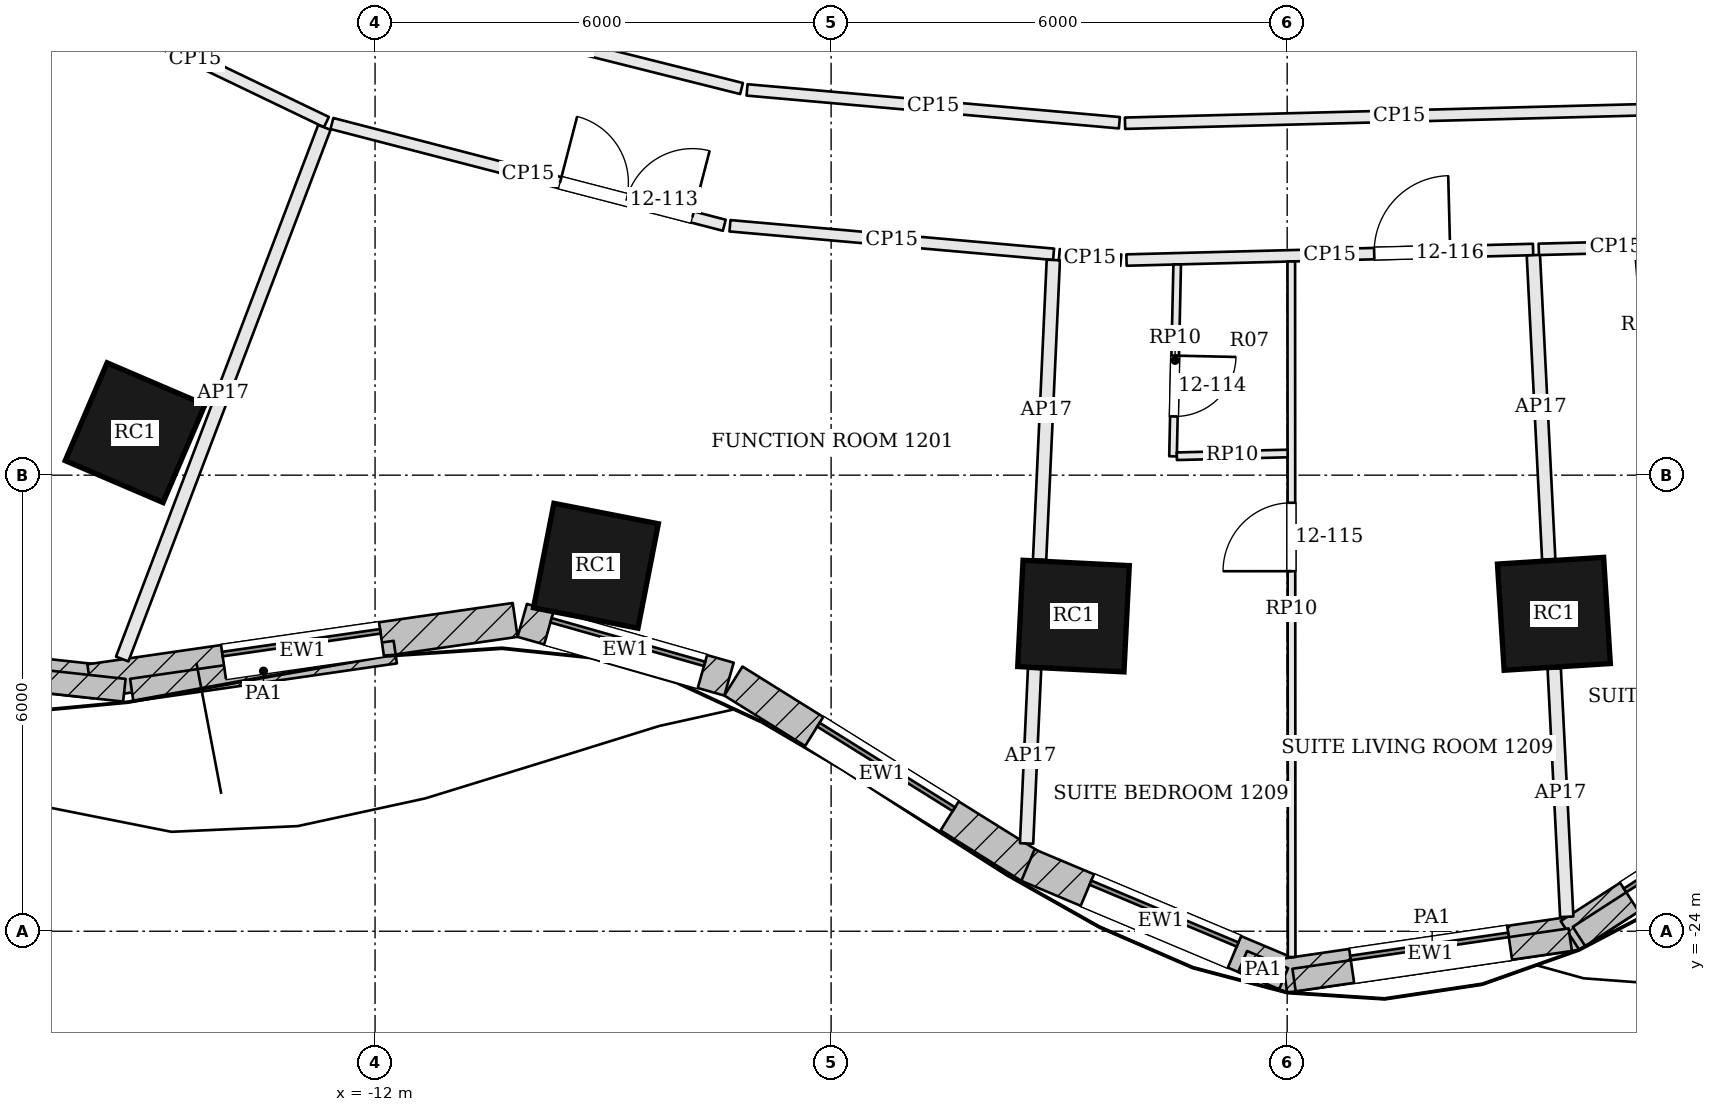
"""IFC4 building model, lengths in metres.
Left out: names, types, materials, properties, quantities, classifications, styles, units other than length and angle.
Written with IfcOpenShell. Run it as: python <this file> out.ifc"""

import sys

from ifc_helpers import new_model, si_unit, direction, frame, frame_2d, origin, origin_2d, place, context, subcontext, project, spatial, rectangle, extrude, element, fill, save


model = new_model("IFC4")
c1 = context("Model", 3, precision=1e-05, world=origin(), true_north=direction((0.0, 1.0)))
c2 = subcontext(c1, "Body", "Model", "MODEL_VIEW")
j1 = project(units=[si_unit("LENGTHUNIT", "METRE"), si_unit("PLANEANGLEUNIT", "RADIAN")], contexts=[c1])
p1 = place(None, origin())
s1 = spatial("IfcSite", under=j1, at=p1, CompositionType="ELEMENT")
p2 = place(p1, origin())
s2 = spatial("IfcBuilding", under=s1, at=p2, CompositionType="ELEMENT")
p3 = place(p2, frame((0.0, 0.0, 59.1)))
s3 = spatial("IfcBuildingStorey", under=s2, at=p3, CompositionType="ELEMENT", Elevation=59.1)
for number, where, z_axis, x_axis in (
    (1, (-15.157, -17.441, 0.0), (0.0, 0.0, 1.0), (0.919, -0.394, 0.0)),
    (2, (-9.094, -19.192, 0.0), (0.0, 0.0, 1.0), (0.981, -0.192, 0.0)),
    (3, (-2.811, -19.854, 0.0), (0.0, 0.0, 1.0), (0.999, -0.05, 0.0)),
    (4, (3.509, -19.824, 0.0), (0.0, 0.0, 1.0), (0.998, 0.063, 0.0)),
):
    element("IfcColumn", number, at=place(p3, frame(where, z_axis=z_axis, x_axis=x_axis)), inside=s3, PredefinedType="COLUMN", context=c2, shape_type="SweptSolid", body=[
        extrude(rectangle(XDim=1.4, YDim=1.4, at=origin_2d()), origin(), (0.0, 0.0, 1.0), 3.6),
    ])
p4 = place(p3, frame((-20.396, -20.196, 0.0), z_axis=(0.0, 0.0, 1.0), x_axis=(0.994063142291, -0.108804729393, 0.0)))
e5 = element("IfcWall", 5, at=p4, inside=s3, PredefinedType="SOLIDWALL", context=c2, shape_type="SweptSolid", body=[
    extrude(rectangle(XDim=4.728, YDim=0.45, at=frame_2d((2.364, 0.0))), origin(), (0.0, 0.0, 1.0), 3.4),
])
p5 = place(p4, frame((1.314, 0.0, 0.9)))
e6 = element("IfcOpeningElement", 6, at=p5, cuts=e5, PredefinedType="OPENING", context=c2, shape_type="SweptSolid", body=[
    extrude(rectangle(XDim=2.1, YDim=2.0, at=frame_2d((1.05, 1.0))), frame((0.0, 0.235, 0.0), z_axis=(0.0, -1.0, 0.0), x_axis=(1.0, 0.0, 0.0)), (0.0, 0.0, 1.0), 0.47),
])
p6 = place(p3, frame((-15.752, -20.711, 0.0), z_axis=(0.0, 0.0, 1.0), x_axis=(0.989761192351, 0.142733255115, 0.0)))
e7 = element("IfcWall", 7, at=p6, inside=s3, PredefinedType="SOLIDWALL", context=c2, shape_type="SweptSolid", body=[
    extrude(rectangle(XDim=5.653, YDim=0.45, at=frame_2d((2.827, 0.0))), origin(), (0.0, 0.0, 1.0), 3.4),
])
p7 = place(p6, frame((1.777, 0.0, 0.9)))
e8 = element("IfcOpeningElement", 8, at=p7, cuts=e7, PredefinedType="OPENING", context=c2, shape_type="SweptSolid", body=[
    extrude(rectangle(XDim=2.1, YDim=2.0, at=frame_2d((1.05, 1.0))), frame((0.0, 0.235, 0.0), z_axis=(0.0, -1.0, 0.0), x_axis=(1.0, 0.0, 0.0)), (0.0, 0.0, 1.0), 0.47),
])
p8 = place(p3, frame((-10.063, -19.911, 0.0), z_axis=(0.0, 0.0, 1.0), x_axis=(0.961982029567, -0.273112751057, 0.0)))
e9 = element("IfcWall", 9, at=p8, inside=s3, PredefinedType="SOLIDWALL", context=c2, shape_type="SweptSolid", body=[
    extrude(rectangle(XDim=2.827, YDim=0.45, at=frame_2d((1.414, 0.0))), origin(), (0.0, 0.0, 1.0), 3.4),
])
p9 = place(p8, frame((0.364, 0.0, 0.9)))
e10 = element("IfcOpeningElement", 10, at=p9, cuts=e9, PredefinedType="OPENING", context=c2, shape_type="SweptSolid", body=[
    extrude(rectangle(XDim=2.1, YDim=2.0, at=frame_2d((1.05, 1.0))), frame((0.0, 0.235, 0.0), z_axis=(0.0, -1.0, 0.0), x_axis=(1.0, 0.0, 0.0)), (0.0, 0.0, 1.0), 0.47),
])
p10 = place(p3, frame((-7.286, -20.708, 0.0), z_axis=(0.0, 0.0, 1.0), x_axis=(0.848420894374, -0.529322194878, 0.0)))
e11 = element("IfcWall", 11, at=p10, inside=s3, PredefinedType="SOLIDWALL", context=c2, shape_type="SweptSolid", body=[
    extrude(rectangle(XDim=4.606, YDim=0.45, at=frame_2d((2.303, 0.0))), origin(), (0.0, 0.0, 1.0), 3.4),
])
p11 = place(p10, frame((1.253, 0.0, 0.9)))
e12 = element("IfcOpeningElement", 12, at=p11, cuts=e11, PredefinedType="OPENING", context=c2, shape_type="SweptSolid", body=[
    extrude(rectangle(XDim=2.1, YDim=2.0, at=frame_2d((1.05, 1.0))), frame((0.0, 0.235, 0.0), z_axis=(0.0, -1.0, 0.0), x_axis=(1.0, 0.0, 0.0)), (0.0, 0.0, 1.0), 0.47),
])
p12 = place(p3, frame((-3.41, -23.13, 0.0), z_axis=(0.0, 0.0, 1.0), x_axis=(0.921914994676, -0.387392233521, 0.0)))
e13 = element("IfcWall", 13, at=p12, inside=s3, PredefinedType="SOLIDWALL", context=c2, shape_type="SweptSolid", body=[
    extrude(rectangle(XDim=3.793, YDim=0.45, at=frame_2d((1.896, 0.0))), origin(), (0.0, 0.0, 1.0), 3.4),
])
p13 = place(p12, frame((0.847, 0.0, 0.9)))
e14 = element("IfcOpeningElement", 14, at=p13, cuts=e13, PredefinedType="OPENING", context=c2, shape_type="SweptSolid", body=[
    extrude(rectangle(XDim=2.1, YDim=2.0, at=frame_2d((1.05, 1.0))), frame((0.0, 0.235, 0.0), z_axis=(0.0, -1.0, 0.0), x_axis=(1.0, 0.0, 0.0)), (0.0, 0.0, 1.0), 0.47),
])
p14 = place(p3, frame((-0.032, -24.584, 0.0), z_axis=(0.0, 0.0, 1.0), x_axis=(0.989495330387, 0.144564833698, 0.0)))
e15 = element("IfcWall", 15, at=p14, inside=s3, PredefinedType="SOLIDWALL", context=c2, shape_type="SweptSolid", body=[
    extrude(rectangle(XDim=3.881, YDim=0.45, at=frame_2d((1.94, 0.0))), origin(), (0.0, 0.0, 1.0), 3.4),
])
p15 = place(p14, frame((0.89, 0.0, 0.9)))
e16 = element("IfcOpeningElement", 16, at=p15, cuts=e15, PredefinedType="OPENING", context=c2, shape_type="SweptSolid", body=[
    extrude(rectangle(XDim=2.1, YDim=2.0, at=frame_2d((1.05, 1.0))), frame((0.0, 0.235, 0.0), z_axis=(0.0, -1.0, 0.0), x_axis=(1.0, 0.0, 0.0)), (0.0, 0.0, 1.0), 0.47),
])
p16 = place(p3, frame((3.721, -24.055, 0.0), z_axis=(0.0, 0.0, 1.0), x_axis=(0.840404438766, 0.54195975801, 0.0)))
e17 = element("IfcWall", 17, at=p16, inside=s3, PredefinedType="SOLIDWALL", context=c2, shape_type="SweptSolid", body=[
    extrude(rectangle(XDim=3.96, YDim=0.45, at=frame_2d((1.98, 0.0))), origin(), (0.0, 0.0, 1.0), 3.4),
])
p17 = place(p16, frame((0.93, 0.0, 0.9)))
e18 = element("IfcOpeningElement", 18, at=p17, cuts=e17, PredefinedType="OPENING", context=c2, shape_type="SweptSolid", body=[
    extrude(rectangle(XDim=2.1, YDim=2.0, at=frame_2d((1.05, 1.0))), frame((0.0, 0.235, 0.0), z_axis=(0.0, -1.0, 0.0), x_axis=(1.0, 0.0, 0.0)), (0.0, 0.0, 1.0), 0.47),
])
p18 = place(p3, frame((-17.772, -20.559, 3.6), z_axis=(0.0, 0.0, 1.0), x_axis=(0.994063072833, -0.108805363973, 0.0)))
e19 = element("IfcWall", 19, at=p18, inside=s3, PredefinedType="PARAPET", context=c2, shape_type="SweptSolid", body=[
    extrude(rectangle(XDim=2.489, YDim=0.3, at=frame_2d((1.244, 0.0))), origin(), (0.0, 0.0, 1.0), 1.1),
])
p19 = place(p3, frame((-15.201, -20.828, 3.6), z_axis=(0.0, 0.0, 1.0), x_axis=(0.989761856496, 0.142728649634, 0.0)))
e20 = element("IfcWall", 20, at=p19, inside=s3, PredefinedType="PARAPET", context=c2, shape_type="SweptSolid", body=[
    extrude(rectangle(XDim=3.503, YDim=0.3, at=frame_2d((1.751, 0.0))), origin(), (0.0, 0.0, 1.0), 1.1),
])
p20 = place(p3, frame((-0.586, -24.398, 3.6), z_axis=(0.0, 0.0, 1.0), x_axis=(0.921949320844, -0.387310534062, 0.0)))
e21 = element("IfcWall", 21, at=p20, inside=s3, PredefinedType="PARAPET", context=c2, shape_type="SweptSolid", body=[
    extrude(rectangle(XDim=0.585, YDim=0.3, at=frame_2d((0.292, 0.0))), origin(), (0.0, 0.0, 1.0), 1.1),
])
p21 = place(p3, frame((0.091, -24.642, 3.6), z_axis=(0.0, 0.0, 1.0), x_axis=(0.989499132051, 0.144538810259, 0.0)))
e22 = element("IfcWall", 22, at=p21, inside=s3, PredefinedType="PARAPET", context=c2, shape_type="SweptSolid", body=[
    extrude(rectangle(XDim=3.672, YDim=0.3, at=frame_2d((1.836, 0.0))), origin(), (0.0, 0.0, 1.0), 1.1),
])
p22 = place(p3, frame((3.839, -24.068, 3.6), z_axis=(0.0, 0.0, 1.0), x_axis=(0.84044157539, 0.541902166776, 0.0)))
e23 = element("IfcWall", 23, at=p22, inside=s3, PredefinedType="PARAPET", context=c2, shape_type="SweptSolid", body=[
    extrude(rectangle(XDim=3.836, YDim=0.3, at=frame_2d((1.918, 0.0))), origin(), (0.0, 0.0, 1.0), 1.1),
])
p23 = place(p3, frame((-16.094, -11.696, 0.0), z_axis=(0.0, 0.0, 1.0), x_axis=(0.901437528344, -0.432909208141, 0.0)))
e24 = element("IfcWall", 24, at=p23, inside=s3, PredefinedType="PARTITIONING", context=c2, shape_type="SweptSolid", body=[
    extrude(rectangle(XDim=3.832, YDim=0.15, at=frame_2d((1.916, 0.0))), origin(), (0.0, 0.0, 1.0), 2.68),
])
p24 = place(p3, frame((-15.327, -20.419, 0.0), z_axis=(0.0, 0.0, 1.0), x_axis=(0.355489175899, 0.934680397686, 0.0)))
e25 = element("IfcWall", 25, at=p24, inside=s3, PredefinedType="PARTITIONING", context=c2, shape_type="SweptSolid", body=[
    extrude(rectangle(XDim=7.482, YDim=0.175, at=frame_2d((3.741, 0.0))), origin(), (0.0, 0.0, 1.0), 2.68),
])
p25 = place(p3, frame((-12.567, -13.374, 0.0), z_axis=(0.0, 0.0, 1.0), x_axis=(0.96798041907, -0.251025712423, 0.0)))
e26 = element("IfcWall", 26, at=p25, inside=s3, PredefinedType="PARTITIONING", context=c2, shape_type="SweptSolid", body=[
    extrude(rectangle(XDim=5.333, YDim=0.15, at=frame_2d((2.666, 0.0))), origin(), (0.0, 0.0, 1.0), 2.68),
])
p26 = place(p25, frame((3.1, 0.0, 0.0)))
e27 = element("IfcOpeningElement", 27, at=p26, cuts=e26, PredefinedType="OPENING", context=c2, shape_type="SweptSolid", body=[
    extrude(rectangle(XDim=1.8, YDim=2.1, at=frame_2d((0.9, 1.05))), frame((0.0, 0.085, 0.0), z_axis=(0.0, -1.0, 0.0), x_axis=(1.0, 0.0, 0.0)), (0.0, 0.0, 1.0), 0.17),
])
p27 = place(p3, frame((-7.331, -14.719, 0.0), z_axis=(0.0, 0.0, 1.0), x_axis=(0.996138963942, -0.087790458003, 0.0)))
e28 = element("IfcWall", 28, at=p27, inside=s3, PredefinedType="PARTITIONING", context=c2, shape_type="SweptSolid", body=[
    extrude(rectangle(XDim=4.274, YDim=0.15, at=frame_2d((2.137, 0.0))), origin(), (0.0, 0.0, 1.0), 2.68),
])
p28 = place(p3, frame((-3.428, -22.845, 0.0), z_axis=(0.0, 0.0, 1.0), x_axis=(0.045783501408, 0.998951385703, 0.0)))
e29 = element("IfcWall", 29, at=p28, inside=s3, PredefinedType="PARTITIONING", context=c2, shape_type="SweptSolid", body=[
    extrude(rectangle(XDim=2.298, YDim=0.175, at=frame_2d((1.149, 0.0))), origin(), (0.0, 0.0, 1.0), 2.68),
])
p29 = place(p3, frame((-3.257, -19.111, 0.0), z_axis=(0.0, 0.0, 1.0), x_axis=(0.045789384655, 0.998951116048, 0.0)))
e30 = element("IfcWall", 30, at=p29, inside=s3, PredefinedType="PARTITIONING", context=c2, shape_type="SweptSolid", body=[
    extrude(rectangle(XDim=3.946, YDim=0.175, at=frame_2d((1.973, 0.0))), origin(), (0.0, 0.0, 1.0), 2.68),
])
p30 = place(p3, frame((-2.998, -15.101, 0.0), z_axis=(0.0, 0.0, 1.0), x_axis=(0.996142993613, -0.087744722213, 0.0)))
e31 = element("IfcWall", 31, at=p30, inside=s3, PredefinedType="PARTITIONING", context=c2, shape_type="SweptSolid", body=[
    extrude(rectangle(XDim=0.812, YDim=0.15, at=frame_2d((0.406, 0.0))), origin(), (0.0, 0.0, 1.0), 2.68),
])
p31 = place(p3, frame((-2.114, -15.17, 0.0), z_axis=(0.0, 0.0, 1.0), x_axis=(0.99966176809, 0.02600671875, 0.0)))
e32 = element("IfcWall", 32, at=p31, inside=s3, PredefinedType="PARTITIONING", context=c2, shape_type="SweptSolid", body=[
    extrude(rectangle(XDim=5.351, YDim=0.15, at=frame_2d((2.675, 0.0))), origin(), (0.0, 0.0, 1.0), 2.68),
])
p32 = place(p31, frame((3.26, 0.0, 0.0)))
e33 = element("IfcOpeningElement", 33, at=p32, cuts=e32, PredefinedType="OPENING", context=c2, shape_type="SweptSolid", body=[
    extrude(rectangle(XDim=1.0, YDim=2.1, at=frame_2d((0.5, 1.05))), frame((0.0, 0.085, 0.0), z_axis=(0.0, -1.0, 0.0), x_axis=(1.0, 0.0, 0.0)), (0.0, 0.0, 1.0), 0.17),
])
p33 = place(p3, frame((3.678, -23.81, 0.0), z_axis=(0.0, 0.0, 1.0), x_axis=(-0.050406902628, 0.998728764063, 0.0)))
e34 = element("IfcWall", 34, at=p33, inside=s3, PredefinedType="PARTITIONING", context=c2, shape_type="SweptSolid", body=[
    extrude(rectangle(XDim=3.269, YDim=0.175, at=frame_2d((1.635, 0.0))), origin(), (0.0, 0.0, 1.0), 2.68),
])
p34 = place(p3, frame((3.441, -19.107, 0.0), z_axis=(0.0, 0.0, 1.0), x_axis=(-0.050399621173, 0.998729131539, 0.0)))
e35 = element("IfcWall", 35, at=p34, inside=s3, PredefinedType="PARTITIONING", context=c2, shape_type="SweptSolid", body=[
    extrude(rectangle(XDim=4.006, YDim=0.175, at=frame_2d((2.003, 0.0))), origin(), (0.0, 0.0, 1.0), 2.68),
])
p35 = place(p3, frame((3.31, -15.029, 0.0), z_axis=(0.0, 0.0, 1.0), x_axis=(0.99966219628, 0.025990254501, 0.0)))
e36 = element("IfcWall", 36, at=p35, inside=s3, PredefinedType="PARTITIONING", context=c2, shape_type="SweptSolid", body=[
    extrude(rectangle(XDim=2.029, YDim=0.15, at=frame_2d((1.015, 0.0))), origin(), (0.0, 0.0, 1.0), 2.68),
])
p36 = place(p3, frame((5.082, -13.182, 0.0), z_axis=(0.0, 0.0, 1.0), x_axis=(-0.999661624383, -0.026012242045, 0.0)))
e37 = element("IfcWall", 37, at=p36, inside=s3, PredefinedType="PARTITIONING", context=c2, shape_type="SweptSolid", body=[
    extrude(rectangle(XDim=7.218, YDim=0.15, at=frame_2d((3.609, 0.0))), origin(), (0.0, 0.0, 1.0), 2.68),
])
p37 = place(p3, frame((-2.208, -13.364, 0.0), z_axis=(0.0, 0.0, 1.0), x_axis=(-0.996134962793, 0.087835846335, 0.0)))
e38 = element("IfcWall", 38, at=p37, inside=s3, PredefinedType="PARTITIONING", context=c2, shape_type="SweptSolid", body=[
    extrude(rectangle(XDim=4.917, YDim=0.15, at=frame_2d((2.458, 0.0))), origin(), (0.0, 0.0, 1.0), 2.68),
])
p38 = place(p3, frame((-7.178, -12.914, 0.0), z_axis=(0.0, 0.0, 1.0), x_axis=(-0.969983523639, 0.243170647628, 0.0)))
e39 = element("IfcWall", 39, at=p38, inside=s3, PredefinedType="PARTITIONING", context=c2, shape_type="SweptSolid", body=[
    extrude(rectangle(XDim=4.794, YDim=0.15, at=frame_2d((2.397, 0.0))), origin(), (0.0, 0.0, 1.0), 2.68),
])
p39 = place(p3, frame((0.059, -24.339, 0.0), z_axis=(0.0, 0.0, 1.0), x_axis=(-0.000506923443, 0.999999871514, 0.0)))
e40 = element("IfcWall", 40, at=p39, inside=s3, PredefinedType="PARTITIONING", context=c2, shape_type="SweptSolid", body=[
    extrude(rectangle(XDim=9.151, YDim=0.1, at=frame_2d((4.575, 0.0))), origin(), (0.0, 0.0, 1.0), 2.898),
])
p40 = place(p39, frame((5.076, 0.0, 0.0)))
e41 = element("IfcOpeningElement", 41, at=p40, cuts=e40, PredefinedType="OPENING", context=c2, shape_type="SweptSolid", body=[
    extrude(rectangle(XDim=0.9, YDim=2.4, at=frame_2d((0.45, 1.2))), frame((0.0, 0.06, 0.0), z_axis=(0.0, -1.0, 0.0), x_axis=(1.0, 0.0, 0.0)), (0.0, 0.0, 1.0), 0.12),
])
p41 = place(p3, frame((-1.447, -15.228, 0.0), z_axis=(0.0, 0.0, 1.0), x_axis=(-0.02165836135, -0.99976543018, 0.0)))
e42 = element("IfcWall", 42, at=p41, inside=s3, PredefinedType="PARTITIONING", context=c2, shape_type="SweptSolid", body=[
    extrude(rectangle(XDim=2.525, YDim=0.1, at=frame_2d((1.262, 0.0))), origin(), (0.0, 0.0, 1.0), 2.898),
])
p42 = place(p41, frame((1.2, 0.0, 0.0)))
e43 = element("IfcOpeningElement", 43, at=p42, cuts=e42, PredefinedType="OPENING", context=c2, shape_type="SweptSolid", body=[
    extrude(rectangle(XDim=0.8, YDim=2.1, at=frame_2d((0.4, 1.05))), frame((0.0, 0.06, 0.0), z_axis=(0.0, -1.0, 0.0), x_axis=(1.0, 0.0, 0.0)), (0.0, 0.0, 1.0), 0.12),
])
p43 = place(p3, frame((-1.452, -17.751, 0.0), z_axis=(0.0, 0.0, 1.0), x_axis=(0.999696887378, 0.024619775916, 0.0)))
e44 = element("IfcWall", 44, at=p43, inside=s3, PredefinedType="PARTITIONING", context=c2, shape_type="SweptSolid", body=[
    extrude(rectangle(XDim=1.458, YDim=0.1, at=frame_2d((0.729, 0.0))), origin(), (0.0, 0.0, 1.0), 2.898),
])
p44 = place(p3, frame((4.63, -15.07, 0.0), z_axis=(0.0, 0.0, 1.0), x_axis=(0.08247732406, -0.996592941484, 0.0)))
e45 = element("IfcWall", 45, at=p44, inside=s3, PredefinedType="PARTITIONING", context=c2, shape_type="SweptSolid", body=[
    extrude(rectangle(XDim=2.525, YDim=0.1, at=frame_2d((1.262, 0.0))), origin(), (0.0, 0.0, 1.0), 2.898),
])
p45 = place(p44, frame((1.2, 0.0, 0.0)))
e46 = element("IfcOpeningElement", 46, at=p45, cuts=e45, PredefinedType="OPENING", context=c2, shape_type="SweptSolid", body=[
    extrude(rectangle(XDim=0.8, YDim=2.1, at=frame_2d((0.4, 1.05))), frame((0.0, 0.06, 0.0), z_axis=(0.0, -1.0, 0.0), x_axis=(1.0, 0.0, 0.0)), (0.0, 0.0, 1.0), 0.12),
])
p46 = place(p7, origin())
e47 = element("IfcWindow", 47, at=p46, inside=s3, PartitioningType="SINGLE_PANEL", PredefinedType="WINDOW", context=c2, shape_type="SweptSolid", body=[
    extrude(rectangle(XDim=2.1, YDim=2.0, at=frame_2d((1.05, 1.0))), frame((0.0, 0.135, 0.0), z_axis=(0.0, -1.0, 0.0), x_axis=(1.0, 0.0, 0.0)), (0.0, 0.0, 1.0), 0.06),
])
fill(e8, e47)
p47 = place(p9, origin())
e48 = element("IfcWindow", 48, at=p47, inside=s3, PartitioningType="SINGLE_PANEL", PredefinedType="WINDOW", context=c2, shape_type="SweptSolid", body=[
    extrude(rectangle(XDim=2.1, YDim=2.0, at=frame_2d((1.05, 1.0))), frame((0.0, 0.135, 0.0), z_axis=(0.0, -1.0, 0.0), x_axis=(1.0, 0.0, 0.0)), (0.0, 0.0, 1.0), 0.06),
])
fill(e10, e48)
p48 = place(p11, origin())
e49 = element("IfcWindow", 49, at=p48, inside=s3, PartitioningType="SINGLE_PANEL", PredefinedType="WINDOW", context=c2, shape_type="SweptSolid", body=[
    extrude(rectangle(XDim=2.1, YDim=2.0, at=frame_2d((1.05, 1.0))), frame((0.0, 0.135, 0.0), z_axis=(0.0, -1.0, 0.0), x_axis=(1.0, 0.0, 0.0)), (0.0, 0.0, 1.0), 0.06),
])
fill(e12, e49)
p49 = place(p13, origin())
e50 = element("IfcWindow", 50, at=p49, inside=s3, PartitioningType="SINGLE_PANEL", PredefinedType="WINDOW", context=c2, shape_type="SweptSolid", body=[
    extrude(rectangle(XDim=2.1, YDim=2.0, at=frame_2d((1.05, 1.0))), frame((0.0, 0.135, 0.0), z_axis=(0.0, -1.0, 0.0), x_axis=(1.0, 0.0, 0.0)), (0.0, 0.0, 1.0), 0.06),
])
fill(e14, e50)
p50 = place(p15, origin())
e51 = element("IfcWindow", 51, at=p50, inside=s3, PartitioningType="SINGLE_PANEL", PredefinedType="WINDOW", context=c2, shape_type="SweptSolid", body=[
    extrude(rectangle(XDim=2.1, YDim=2.0, at=frame_2d((1.05, 1.0))), frame((0.0, 0.135, 0.0), z_axis=(0.0, -1.0, 0.0), x_axis=(1.0, 0.0, 0.0)), (0.0, 0.0, 1.0), 0.06),
])
fill(e16, e51)
p51 = place(p17, origin())
e52 = element("IfcWindow", 52, at=p51, inside=s3, PartitioningType="SINGLE_PANEL", PredefinedType="WINDOW", context=c2, shape_type="SweptSolid", body=[
    extrude(rectangle(XDim=2.1, YDim=2.0, at=frame_2d((1.05, 1.0))), frame((0.0, 0.135, 0.0), z_axis=(0.0, -1.0, 0.0), x_axis=(1.0, 0.0, 0.0)), (0.0, 0.0, 1.0), 0.06),
])
fill(e18, e52)
p52 = place(p26, origin())
e53 = element("IfcDoor", 53, at=p52, inside=s3, OperationType="DOUBLE_DOOR_SINGLE_SWING", PredefinedType="DOOR", context=c2, shape_type="SweptSolid", body=[
    extrude(rectangle(XDim=1.8, YDim=2.1, at=frame_2d((0.9, 1.05))), frame((0.0, 0.025, 0.0), z_axis=(0.0, -1.0, 0.0), x_axis=(1.0, 0.0, 0.0)), (0.0, 0.0, 1.0), 0.05),
])
fill(e27, e53)
p53 = place(p42, origin())
e54 = element("IfcDoor", 54, at=p53, inside=s3, OperationType="SINGLE_SWING_LEFT", PredefinedType="DOOR", context=c2, shape_type="SweptSolid", body=[
    extrude(rectangle(XDim=0.8, YDim=2.1, at=frame_2d((0.4, 1.05))), frame((0.0, 0.025, 0.0), z_axis=(0.0, -1.0, 0.0), x_axis=(1.0, 0.0, 0.0)), (0.0, 0.0, 1.0), 0.05),
])
fill(e43, e54)
p54 = place(p40, origin())
e55 = element("IfcDoor", 55, at=p54, inside=s3, OperationType="SINGLE_SWING_LEFT", PredefinedType="DOOR", context=c2, shape_type="SweptSolid", body=[
    extrude(rectangle(XDim=0.9, YDim=2.4, at=frame_2d((0.45, 1.2))), frame((0.0, 0.025, 0.0), z_axis=(0.0, -1.0, 0.0), x_axis=(1.0, 0.0, 0.0)), (0.0, 0.0, 1.0), 0.05),
])
fill(e41, e55)
p55 = place(p32, origin())
e56 = element("IfcDoor", 56, at=p55, inside=s3, OperationType="SINGLE_SWING_RIGHT", PredefinedType="DOOR", context=c2, shape_type="SweptSolid", body=[
    extrude(rectangle(XDim=1.0, YDim=2.1, at=frame_2d((0.5, 1.05))), frame((0.0, 0.025, 0.0), z_axis=(0.0, -1.0, 0.0), x_axis=(1.0, 0.0, 0.0)), (0.0, 0.0, 1.0), 0.05),
])
fill(e33, e56)
save(model, sys.argv[1])
